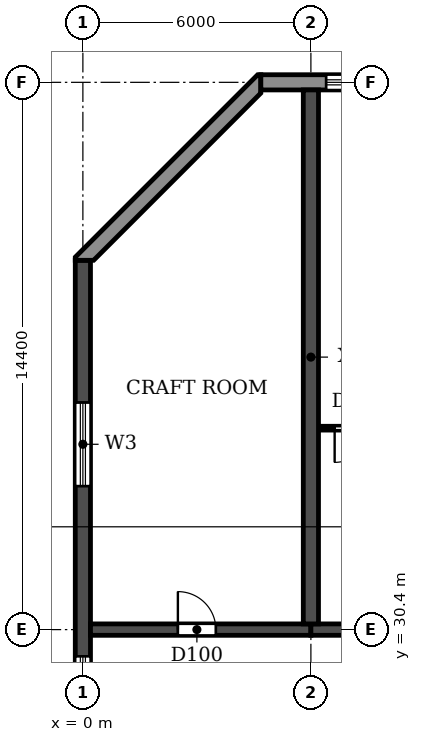
"""IFC4 building model, lengths in metres.
Left out: names, types, materials, properties, quantities, classifications, styles, units other than length and angle.
Written with IfcOpenShell. Run it as: python <this file> out.ifc"""

import sys

from ifc_helpers import new_model, si_unit, direction, frame, frame_2d, origin, place, context, subcontext, project, spatial, polyline, rectangle, outline, extrude, element, fill, save


model = new_model("IFC4")
c1 = context("Model", 3, precision=1e-05, world=origin(), true_north=direction((0.0, 1.0)))
c2 = subcontext(c1, "Body", "Model", "MODEL_VIEW")
j1 = project(units=[si_unit("LENGTHUNIT", "METRE"), si_unit("PLANEANGLEUNIT", "RADIAN")], contexts=[c1])
p1 = place(None, origin())
s1 = spatial("IfcSite", under=j1, at=p1, CompositionType="ELEMENT")
p2 = place(p1, origin())
s2 = spatial("IfcBuilding", under=s1, at=p2, CompositionType="ELEMENT")
p3 = place(p2, frame((0.0, 0.0, 23.4)))
s3 = spatial("IfcBuildingStorey", under=s2, at=p3, CompositionType="ELEMENT", Elevation=23.4)
p4 = place(p3, frame((6.0, 30.55, 0.0), z_axis=(0.0, 0.0, 1.0), x_axis=(0.0, 1.0, 0.0)))
e1 = element("IfcWall", 1, at=p4, inside=s3, PredefinedType="SHEAR", context=c2, shape_type="SweptSolid", body=[
    extrude(rectangle(XDim=14.05, YDim=0.4, at=frame_2d((7.025, 0.0))), origin(), (0.0, 0.0, 1.0), 3.05),
])
p5 = place(p3, frame((0.0, 4.683, 0.0), z_axis=(0.0, 0.0, 1.0), x_axis=(0.0, 1.0, 0.0)))
e2 = element("IfcWall", 2, at=p5, inside=s3, PredefinedType="SHEAR", context=c2, shape_type="SweptSolid", body=[
    extrude(rectangle(XDim=35.434, YDim=0.4, at=frame_2d((17.717, 0.0))), origin(), (0.0, 0.0, 1.0), 3.05),
])
p6 = place(p5, frame((23.817, 0.0, 0.9)))
e3 = element("IfcOpeningElement", 3, at=p6, cuts=e2, PredefinedType="OPENING", context=c2, shape_type="SweptSolid", body=[
    extrude(rectangle(XDim=1.2, YDim=1.5, at=frame_2d((0.6, 0.75))), frame((0.0, 0.21, 0.0), z_axis=(0.0, -1.0, 0.0), x_axis=(1.0, 0.0, 0.0)), (0.0, 0.0, 1.0), 0.42),
])
p7 = place(p5, frame((8.017, 0.0, 0.9)))
e4 = element("IfcOpeningElement", 4, at=p7, cuts=e2, PredefinedType="OPENING", context=c2, shape_type="SweptSolid", body=[
    extrude(rectangle(XDim=1.2, YDim=1.5, at=frame_2d((0.6, 0.75))), frame((0.0, 0.21, 0.0), z_axis=(0.0, -1.0, 0.0), x_axis=(1.0, 0.0, 0.0)), (0.0, 0.0, 1.0), 0.42),
])
p8 = place(p5, frame((15.917, 0.0, 0.9)))
e5 = element("IfcOpeningElement", 5, at=p8, cuts=e2, PredefinedType="OPENING", context=c2, shape_type="SweptSolid", body=[
    extrude(rectangle(XDim=1.2, YDim=1.5, at=frame_2d((0.6, 0.75))), frame((0.0, 0.21, 0.0), z_axis=(0.0, -1.0, 0.0), x_axis=(1.0, 0.0, 0.0)), (0.0, 0.0, 1.0), 0.42),
])
p9 = place(p5, frame((29.493, 0.0, 0.6)))
e6 = element("IfcOpeningElement", 6, at=p9, cuts=e2, PredefinedType="OPENING", context=c2, shape_type="SweptSolid", body=[
    extrude(rectangle(XDim=2.2, YDim=1.8, at=frame_2d((1.1, 0.9))), frame((0.0, 0.21, 0.0), z_axis=(0.0, -1.0, 0.0), x_axis=(1.0, 0.0, 0.0)), (0.0, 0.0, 1.0), 0.42),
])
p10 = place(p5, frame((2.541, 0.0, 0.6)))
e7 = element("IfcOpeningElement", 7, at=p10, cuts=e2, PredefinedType="OPENING", context=c2, shape_type="SweptSolid", body=[
    extrude(rectangle(XDim=2.2, YDim=1.8, at=frame_2d((1.1, 0.9))), frame((0.0, 0.21, 0.0), z_axis=(0.0, -1.0, 0.0), x_axis=(1.0, 0.0, 0.0)), (0.0, 0.0, 1.0), 0.42),
])
p11 = place(p3, frame((0.2, 30.4, 0.0), z_axis=(0.0, 0.0, 1.0), x_axis=(1.0, 0.0, 0.0)))
e8 = element("IfcWall", 8, at=p11, inside=s3, PredefinedType="SHEAR", context=c2, shape_type="SweptSolid", body=[
    extrude(rectangle(XDim=5.8, YDim=0.3, at=frame_2d((2.9, 0.0))), origin(), (0.0, 0.0, 1.0), 2.45),
])
p12 = place(p11, frame((2.3, 0.0, 0.0)))
e9 = element("IfcOpeningElement", 9, at=p12, cuts=e8, PredefinedType="OPENING", context=c2, shape_type="SweptSolid", body=[
    extrude(rectangle(XDim=1.0, YDim=2.1, at=frame_2d((0.5, 1.05))), frame((0.0, 0.16, 0.0), z_axis=(0.0, -1.0, 0.0), x_axis=(1.0, 0.0, 0.0)), (0.0, 0.0, 1.0), 0.32),
])
p13 = place(p3, frame((6.0, 30.4, 0.0), z_axis=(0.0, 0.0, 1.0), x_axis=(1.0, 0.0, 0.0)))
e10 = element("IfcWall", 10, at=p13, inside=s3, PredefinedType="SHEAR", context=c2, shape_type="SweptSolid", body=[
    extrude(rectangle(XDim=6.0, YDim=0.3, at=frame_2d((3.0, 0.0))), origin(), (0.0, 0.0, 1.0), 2.45),
])
p14 = place(p13, frame((2.55, 0.0, 0.0)))
e11 = element("IfcOpeningElement", 11, at=p14, cuts=e10, PredefinedType="OPENING", context=c2, shape_type="SweptSolid", body=[
    extrude(rectangle(XDim=1.0, YDim=2.1, at=frame_2d((0.5, 1.05))), frame((0.0, 0.16, 0.0), z_axis=(0.0, -1.0, 0.0), x_axis=(1.0, 0.0, 0.0)), (0.0, 0.0, 1.0), 0.32),
])
p15 = place(p3, frame((97.317, 44.8, 0.0), z_axis=(0.0, 0.0, 1.0), x_axis=(-1.0, 0.0, 0.0)))
e12 = element("IfcWall", 12, at=p15, inside=s3, PredefinedType="STANDARD", context=c2, shape_type="SweptSolid", body=[
    extrude(rectangle(XDim=92.634, YDim=0.4, at=frame_2d((46.317, 0.0))), origin(), (0.0, 0.0, 1.0), 3.05),
])
p16 = place(p15, frame((88.717, 0.0, 0.9)))
e13 = element("IfcOpeningElement", 13, at=p16, cuts=e12, PredefinedType="OPENING", context=c2, shape_type="SweptSolid", body=[
    extrude(rectangle(XDim=2.2, YDim=1.5, at=frame_2d((1.1, 0.75))), frame((0.0, 0.21, 0.0), z_axis=(0.0, -1.0, 0.0), x_axis=(1.0, 0.0, 0.0)), (0.0, 0.0, 1.0), 0.42),
])
p17 = place(p15, frame((85.917, 0.0, 0.0)))
e14 = element("IfcOpeningElement", 14, at=p17, cuts=e12, PredefinedType="OPENING", context=c2, shape_type="SweptSolid", body=[
    extrude(rectangle(XDim=1.8, YDim=2.4, at=frame_2d((0.9, 1.2))), frame((0.0, 0.21, 0.0), z_axis=(0.0, -1.0, 0.0), x_axis=(1.0, 0.0, 0.0)), (0.0, 0.0, 1.0), 0.42),
])
p18 = place(p15, frame((82.717, 0.0, 0.9)))
e15 = element("IfcOpeningElement", 15, at=p18, cuts=e12, PredefinedType="OPENING", context=c2, shape_type="SweptSolid", body=[
    extrude(rectangle(XDim=2.2, YDim=1.5, at=frame_2d((1.1, 0.75))), frame((0.0, 0.21, 0.0), z_axis=(0.0, -1.0, 0.0), x_axis=(1.0, 0.0, 0.0)), (0.0, 0.0, 1.0), 0.42),
])
p19 = place(p15, frame((79.717, 0.0, 0.9)))
e16 = element("IfcOpeningElement", 16, at=p19, cuts=e12, PredefinedType="OPENING", context=c2, shape_type="SweptSolid", body=[
    extrude(rectangle(XDim=2.2, YDim=1.5, at=frame_2d((1.1, 0.75))), frame((0.0, 0.21, 0.0), z_axis=(0.0, -1.0, 0.0), x_axis=(1.0, 0.0, 0.0)), (0.0, 0.0, 1.0), 0.42),
])
p20 = place(p15, frame((76.917, 0.0, 0.0)))
e17 = element("IfcOpeningElement", 17, at=p20, cuts=e12, PredefinedType="OPENING", context=c2, shape_type="SweptSolid", body=[
    extrude(rectangle(XDim=1.8, YDim=2.4, at=frame_2d((0.9, 1.2))), frame((0.0, 0.21, 0.0), z_axis=(0.0, -1.0, 0.0), x_axis=(1.0, 0.0, 0.0)), (0.0, 0.0, 1.0), 0.42),
])
p21 = place(p15, frame((73.717, 0.0, 0.9)))
e18 = element("IfcOpeningElement", 18, at=p21, cuts=e12, PredefinedType="OPENING", context=c2, shape_type="SweptSolid", body=[
    extrude(rectangle(XDim=2.2, YDim=1.5, at=frame_2d((1.1, 0.75))), frame((0.0, 0.21, 0.0), z_axis=(0.0, -1.0, 0.0), x_axis=(1.0, 0.0, 0.0)), (0.0, 0.0, 1.0), 0.42),
])
p22 = place(p15, frame((70.717, 0.0, 0.9)))
e19 = element("IfcOpeningElement", 19, at=p22, cuts=e12, PredefinedType="OPENING", context=c2, shape_type="SweptSolid", body=[
    extrude(rectangle(XDim=2.2, YDim=1.5, at=frame_2d((1.1, 0.75))), frame((0.0, 0.21, 0.0), z_axis=(0.0, -1.0, 0.0), x_axis=(1.0, 0.0, 0.0)), (0.0, 0.0, 1.0), 0.42),
])
p23 = place(p15, frame((67.717, 0.0, 0.9)))
e20 = element("IfcOpeningElement", 20, at=p23, cuts=e12, PredefinedType="OPENING", context=c2, shape_type="SweptSolid", body=[
    extrude(rectangle(XDim=2.2, YDim=1.5, at=frame_2d((1.1, 0.75))), frame((0.0, 0.21, 0.0), z_axis=(0.0, -1.0, 0.0), x_axis=(1.0, 0.0, 0.0)), (0.0, 0.0, 1.0), 0.42),
])
p24 = place(p15, frame((64.917, 0.0, 0.0)))
e21 = element("IfcOpeningElement", 21, at=p24, cuts=e12, PredefinedType="OPENING", context=c2, shape_type="SweptSolid", body=[
    extrude(rectangle(XDim=1.8, YDim=2.4, at=frame_2d((0.9, 1.2))), frame((0.0, 0.21, 0.0), z_axis=(0.0, -1.0, 0.0), x_axis=(1.0, 0.0, 0.0)), (0.0, 0.0, 1.0), 0.42),
])
p25 = place(p15, frame((61.717, 0.0, 0.9)))
e22 = element("IfcOpeningElement", 22, at=p25, cuts=e12, PredefinedType="OPENING", context=c2, shape_type="SweptSolid", body=[
    extrude(rectangle(XDim=2.2, YDim=1.5, at=frame_2d((1.1, 0.75))), frame((0.0, 0.21, 0.0), z_axis=(0.0, -1.0, 0.0), x_axis=(1.0, 0.0, 0.0)), (0.0, 0.0, 1.0), 0.42),
])
p26 = place(p15, frame((58.717, 0.0, 0.9)))
e23 = element("IfcOpeningElement", 23, at=p26, cuts=e12, PredefinedType="OPENING", context=c2, shape_type="SweptSolid", body=[
    extrude(rectangle(XDim=2.2, YDim=1.5, at=frame_2d((1.1, 0.75))), frame((0.0, 0.21, 0.0), z_axis=(0.0, -1.0, 0.0), x_axis=(1.0, 0.0, 0.0)), (0.0, 0.0, 1.0), 0.42),
])
p27 = place(p15, frame((55.917, 0.0, 0.0)))
e24 = element("IfcOpeningElement", 24, at=p27, cuts=e12, PredefinedType="OPENING", context=c2, shape_type="SweptSolid", body=[
    extrude(rectangle(XDim=1.8, YDim=2.4, at=frame_2d((0.9, 1.2))), frame((0.0, 0.21, 0.0), z_axis=(0.0, -1.0, 0.0), x_axis=(1.0, 0.0, 0.0)), (0.0, 0.0, 1.0), 0.42),
])
p28 = place(p15, frame((52.917, 0.0, 0.0)))
e25 = element("IfcOpeningElement", 25, at=p28, cuts=e12, PredefinedType="OPENING", context=c2, shape_type="SweptSolid", body=[
    extrude(rectangle(XDim=1.8, YDim=2.4, at=frame_2d((0.9, 1.2))), frame((0.0, 0.21, 0.0), z_axis=(0.0, -1.0, 0.0), x_axis=(1.0, 0.0, 0.0)), (0.0, 0.0, 1.0), 0.42),
])
p29 = place(p15, frame((49.717, 0.0, 0.9)))
e26 = element("IfcOpeningElement", 26, at=p29, cuts=e12, PredefinedType="OPENING", context=c2, shape_type="SweptSolid", body=[
    extrude(rectangle(XDim=2.2, YDim=1.5, at=frame_2d((1.1, 0.75))), frame((0.0, 0.21, 0.0), z_axis=(0.0, -1.0, 0.0), x_axis=(1.0, 0.0, 0.0)), (0.0, 0.0, 1.0), 0.42),
])
p30 = place(p15, frame((46.917, 0.0, 0.0)))
e27 = element("IfcOpeningElement", 27, at=p30, cuts=e12, PredefinedType="OPENING", context=c2, shape_type="SweptSolid", body=[
    extrude(rectangle(XDim=1.8, YDim=2.4, at=frame_2d((0.9, 1.2))), frame((0.0, 0.21, 0.0), z_axis=(0.0, -1.0, 0.0), x_axis=(1.0, 0.0, 0.0)), (0.0, 0.0, 1.0), 0.42),
])
p31 = place(p15, frame((43.717, 0.0, 0.9)))
e28 = element("IfcOpeningElement", 28, at=p31, cuts=e12, PredefinedType="OPENING", context=c2, shape_type="SweptSolid", body=[
    extrude(rectangle(XDim=2.2, YDim=1.5, at=frame_2d((1.1, 0.75))), frame((0.0, 0.21, 0.0), z_axis=(0.0, -1.0, 0.0), x_axis=(1.0, 0.0, 0.0)), (0.0, 0.0, 1.0), 0.42),
])
p32 = place(p15, frame((40.717, 0.0, 0.9)))
e29 = element("IfcOpeningElement", 29, at=p32, cuts=e12, PredefinedType="OPENING", context=c2, shape_type="SweptSolid", body=[
    extrude(rectangle(XDim=2.2, YDim=1.5, at=frame_2d((1.1, 0.75))), frame((0.0, 0.21, 0.0), z_axis=(0.0, -1.0, 0.0), x_axis=(1.0, 0.0, 0.0)), (0.0, 0.0, 1.0), 0.42),
])
p33 = place(p15, frame((37.917, 0.0, 0.0)))
e30 = element("IfcOpeningElement", 30, at=p33, cuts=e12, PredefinedType="OPENING", context=c2, shape_type="SweptSolid", body=[
    extrude(rectangle(XDim=1.8, YDim=2.4, at=frame_2d((0.9, 1.2))), frame((0.0, 0.21, 0.0), z_axis=(0.0, -1.0, 0.0), x_axis=(1.0, 0.0, 0.0)), (0.0, 0.0, 1.0), 0.42),
])
p34 = place(p15, frame((34.917, 0.0, 0.0)))
e31 = element("IfcOpeningElement", 31, at=p34, cuts=e12, PredefinedType="OPENING", context=c2, shape_type="SweptSolid", body=[
    extrude(rectangle(XDim=1.8, YDim=2.4, at=frame_2d((0.9, 1.2))), frame((0.0, 0.21, 0.0), z_axis=(0.0, -1.0, 0.0), x_axis=(1.0, 0.0, 0.0)), (0.0, 0.0, 1.0), 0.42),
])
p35 = place(p15, frame((31.717, 0.0, 0.9)))
e32 = element("IfcOpeningElement", 32, at=p35, cuts=e12, PredefinedType="OPENING", context=c2, shape_type="SweptSolid", body=[
    extrude(rectangle(XDim=2.2, YDim=1.5, at=frame_2d((1.1, 0.75))), frame((0.0, 0.21, 0.0), z_axis=(0.0, -1.0, 0.0), x_axis=(1.0, 0.0, 0.0)), (0.0, 0.0, 1.0), 0.42),
])
p36 = place(p15, frame((28.717, 0.0, 0.9)))
e33 = element("IfcOpeningElement", 33, at=p36, cuts=e12, PredefinedType="OPENING", context=c2, shape_type="SweptSolid", body=[
    extrude(rectangle(XDim=2.2, YDim=1.5, at=frame_2d((1.1, 0.75))), frame((0.0, 0.21, 0.0), z_axis=(0.0, -1.0, 0.0), x_axis=(1.0, 0.0, 0.0)), (0.0, 0.0, 1.0), 0.42),
])
p37 = place(p15, frame((25.717, 0.0, 0.9)))
e34 = element("IfcOpeningElement", 34, at=p37, cuts=e12, PredefinedType="OPENING", context=c2, shape_type="SweptSolid", body=[
    extrude(rectangle(XDim=2.2, YDim=1.5, at=frame_2d((1.1, 0.75))), frame((0.0, 0.21, 0.0), z_axis=(0.0, -1.0, 0.0), x_axis=(1.0, 0.0, 0.0)), (0.0, 0.0, 1.0), 0.42),
])
p38 = place(p15, frame((22.717, 0.0, 0.9)))
e35 = element("IfcOpeningElement", 35, at=p38, cuts=e12, PredefinedType="OPENING", context=c2, shape_type="SweptSolid", body=[
    extrude(rectangle(XDim=2.2, YDim=1.5, at=frame_2d((1.1, 0.75))), frame((0.0, 0.21, 0.0), z_axis=(0.0, -1.0, 0.0), x_axis=(1.0, 0.0, 0.0)), (0.0, 0.0, 1.0), 0.42),
])
p39 = place(p15, frame((19.917, 0.0, 0.0)))
e36 = element("IfcOpeningElement", 36, at=p39, cuts=e12, PredefinedType="OPENING", context=c2, shape_type="SweptSolid", body=[
    extrude(rectangle(XDim=1.8, YDim=2.4, at=frame_2d((0.9, 1.2))), frame((0.0, 0.21, 0.0), z_axis=(0.0, -1.0, 0.0), x_axis=(1.0, 0.0, 0.0)), (0.0, 0.0, 1.0), 0.42),
])
p40 = place(p15, frame((16.717, 0.0, 0.9)))
e37 = element("IfcOpeningElement", 37, at=p40, cuts=e12, PredefinedType="OPENING", context=c2, shape_type="SweptSolid", body=[
    extrude(rectangle(XDim=2.2, YDim=1.5, at=frame_2d((1.1, 0.75))), frame((0.0, 0.21, 0.0), z_axis=(0.0, -1.0, 0.0), x_axis=(1.0, 0.0, 0.0)), (0.0, 0.0, 1.0), 0.42),
])
p41 = place(p15, frame((13.717, 0.0, 0.9)))
e38 = element("IfcOpeningElement", 38, at=p41, cuts=e12, PredefinedType="OPENING", context=c2, shape_type="SweptSolid", body=[
    extrude(rectangle(XDim=2.2, YDim=1.5, at=frame_2d((1.1, 0.75))), frame((0.0, 0.21, 0.0), z_axis=(0.0, -1.0, 0.0), x_axis=(1.0, 0.0, 0.0)), (0.0, 0.0, 1.0), 0.42),
])
p42 = place(p15, frame((10.717, 0.0, 0.9)))
e39 = element("IfcOpeningElement", 39, at=p42, cuts=e12, PredefinedType="OPENING", context=c2, shape_type="SweptSolid", body=[
    extrude(rectangle(XDim=2.2, YDim=1.5, at=frame_2d((1.1, 0.75))), frame((0.0, 0.21, 0.0), z_axis=(0.0, -1.0, 0.0), x_axis=(1.0, 0.0, 0.0)), (0.0, 0.0, 1.0), 0.42),
])
p43 = place(p15, frame((7.917, 0.0, 0.0)))
e40 = element("IfcOpeningElement", 40, at=p43, cuts=e12, PredefinedType="OPENING", context=c2, shape_type="SweptSolid", body=[
    extrude(rectangle(XDim=1.8, YDim=2.4, at=frame_2d((0.9, 1.2))), frame((0.0, 0.21, 0.0), z_axis=(0.0, -1.0, 0.0), x_axis=(1.0, 0.0, 0.0)), (0.0, 0.0, 1.0), 0.42),
])
p44 = place(p15, frame((4.917, 0.0, 0.0)))
e41 = element("IfcOpeningElement", 41, at=p44, cuts=e12, PredefinedType="OPENING", context=c2, shape_type="SweptSolid", body=[
    extrude(rectangle(XDim=1.8, YDim=2.4, at=frame_2d((0.9, 1.2))), frame((0.0, 0.21, 0.0), z_axis=(0.0, -1.0, 0.0), x_axis=(1.0, 0.0, 0.0)), (0.0, 0.0, 1.0), 0.42),
])
p45 = place(p15, frame((1.717, 0.0, 0.9)))
e42 = element("IfcOpeningElement", 42, at=p45, cuts=e12, PredefinedType="OPENING", context=c2, shape_type="SweptSolid", body=[
    extrude(rectangle(XDim=2.2, YDim=1.5, at=frame_2d((1.1, 0.75))), frame((0.0, 0.21, 0.0), z_axis=(0.0, -1.0, 0.0), x_axis=(1.0, 0.0, 0.0)), (0.0, 0.0, 1.0), 0.42),
])
p46 = place(p3, origin())
e43 = element("IfcWall", 43, at=p46, inside=s3, PredefinedType="STANDARD", context=c2, shape_type="SweptSolid", body=[
    extrude(outline(polyline([(4.683, 45.0), (4.6, 45.0), (-0.2, 40.2), (-0.2, 40.117), (0.283, 40.117), (4.683, 44.517), (4.683, 45.0)])), origin(), (0.0, 0.0, 1.0), 3.05),
])
p47 = place(p3, frame((6.21, 35.7, 0.0), z_axis=(0.0, 0.0, 1.0), x_axis=(1.0, 0.0, 0.0)))
e44 = element("IfcWall", 44, at=p47, inside=s3, PredefinedType="PARTITIONING", context=c2, shape_type="SweptSolid", body=[
    extrude(rectangle(XDim=1.99, YDim=0.1, at=frame_2d((0.995, 0.0))), origin(), (0.0, 0.0, 1.0), 3.05),
])
p48 = place(p47, frame((0.415, 0.0, 0.0)))
e45 = element("IfcOpeningElement", 45, at=p48, cuts=e44, PredefinedType="OPENING", context=c2, shape_type="SweptSolid", body=[
    extrude(rectangle(XDim=0.9, YDim=2.1, at=frame_2d((0.45, 1.05))), frame((0.0, 0.06, 0.0), z_axis=(0.0, -1.0, 0.0), x_axis=(1.0, 0.0, 0.0)), (0.0, 0.0, 1.0), 0.12),
])
p49 = place(p16, origin())
e46 = element("IfcWindow", 46, at=p49, inside=s3, PartitioningType="DOUBLE_PANEL_HORIZONTAL", PredefinedType="WINDOW", context=c2, shape_type="SweptSolid", body=[
    extrude(rectangle(XDim=2.2, YDim=1.5, at=frame_2d((1.1, 0.75))), frame((0.0, 0.03, 0.0), z_axis=(0.0, -1.0, 0.0), x_axis=(1.0, 0.0, 0.0)), (0.0, 0.0, 1.0), 0.06),
])
fill(e13, e46)
p50 = place(p6, origin())
e47 = element("IfcWindow", 47, at=p50, inside=s3, PartitioningType="SINGLE_PANEL", PredefinedType="WINDOW", context=c2, shape_type="SweptSolid", body=[
    extrude(rectangle(XDim=1.2, YDim=1.5, at=frame_2d((0.6, 0.75))), frame((0.0, 0.03, 0.0), z_axis=(0.0, -1.0, 0.0), x_axis=(1.0, 0.0, 0.0)), (0.0, 0.0, 1.0), 0.06),
])
fill(e3, e47)
p51 = place(p9, origin())
e48 = element("IfcWindow", 48, at=p51, inside=s3, PartitioningType="DOUBLE_PANEL_HORIZONTAL", PredefinedType="WINDOW", context=c2, shape_type="SweptSolid", body=[
    extrude(rectangle(XDim=2.2, YDim=1.8, at=frame_2d((1.1, 0.9))), frame((0.0, 0.03, 0.0), z_axis=(0.0, -1.0, 0.0), x_axis=(1.0, 0.0, 0.0)), (0.0, 0.0, 1.0), 0.06),
])
fill(e6, e48)
p52 = place(p12, origin())
e49 = element("IfcDoor", 49, at=p52, inside=s3, OperationType="SINGLE_SWING_LEFT", PredefinedType="DOOR", context=c2, shape_type="SweptSolid", body=[
    extrude(rectangle(XDim=1.0, YDim=2.1, at=frame_2d((0.5, 1.05))), frame((0.0, 0.025, 0.0), z_axis=(0.0, -1.0, 0.0), x_axis=(1.0, 0.0, 0.0)), (0.0, 0.0, 1.0), 0.05),
])
fill(e9, e49)
p53 = place(p48, frame((0.9, 0.0, 0.0), z_axis=(0.0, 0.0, 1.0), x_axis=(-1.0, 0.0, 0.0)))
e50 = element("IfcDoor", 50, at=p53, inside=s3, OperationType="SINGLE_SWING_RIGHT", PredefinedType="DOOR", context=c2, shape_type="SweptSolid", body=[
    extrude(rectangle(XDim=0.9, YDim=2.1, at=frame_2d((0.45, 1.05))), frame((0.0, 0.025, 0.0), z_axis=(0.0, -1.0, 0.0), x_axis=(1.0, 0.0, 0.0)), (0.0, 0.0, 1.0), 0.05),
])
fill(e45, e50)
save(model, sys.argv[1])
